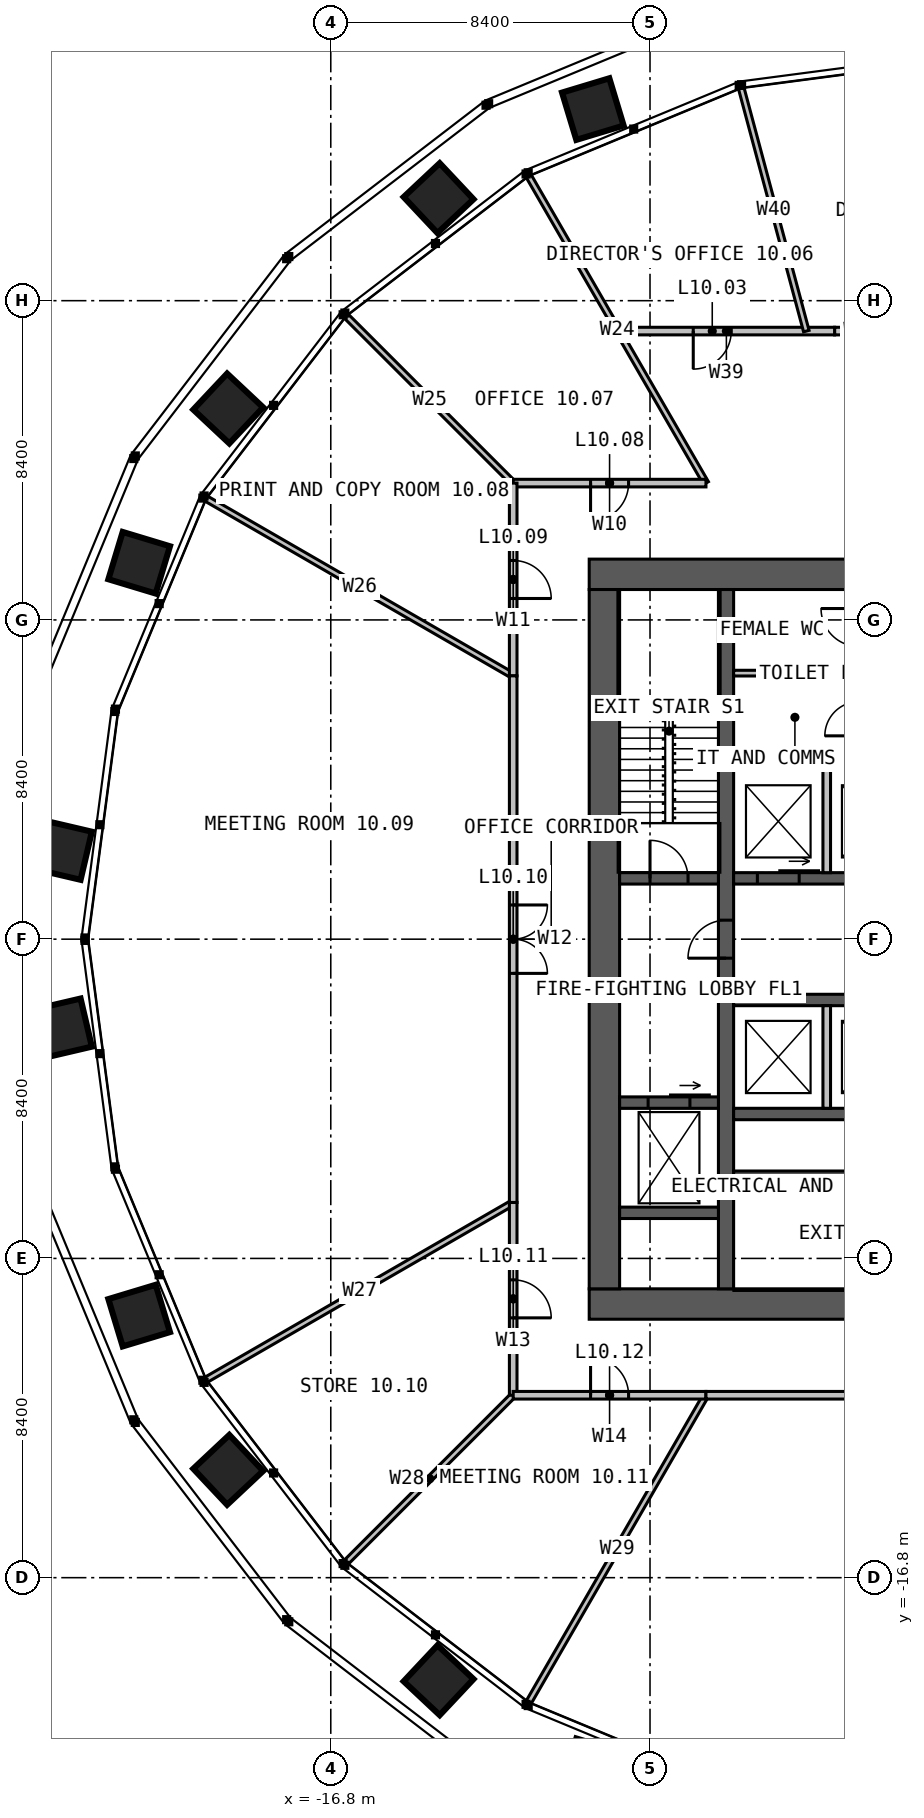
"""IFC4 building model, lengths in metres.
Left out: names, types, materials, properties, quantities, classifications, styles, units other than length and angle.
Written with IfcOpenShell. Run it as: python <this file> out.ifc"""

import sys

from ifc_helpers import new_model, si_unit, direction, frame, frame_2d, origin, place, context, subcontext, project, spatial, rectangle, extrude, element, fill, save


model = new_model("IFC4")
c1 = context("Model", 3, precision=1e-05, world=origin(), true_north=direction((0.0, 1.0)))
c2 = subcontext(c1, "Body", "Model", "MODEL_VIEW")
j1 = project(units=[si_unit("LENGTHUNIT", "METRE"), si_unit("PLANEANGLEUNIT", "RADIAN")], contexts=[c1])
p1 = place(None, origin())
s1 = spatial("IfcSite", under=j1, at=p1, CompositionType="ELEMENT")
p2 = place(p1, origin())
s2 = spatial("IfcBuilding", under=s1, at=p2, CompositionType="ELEMENT")
p3 = place(p2, frame((0.0, 0.0, 45.0)))
s3 = spatial("IfcBuildingStorey", under=s2, at=p3, CompositionType="ELEMENT", Elevation=45.0)
p4 = place(p3, frame((-10.0, 9.6, 0.0), z_axis=(0.0, 0.0, 1.0), x_axis=(1.0, 0.0, 0.0)))
e1 = element("IfcWall", 1, at=p4, inside=s3, PredefinedType="SOLIDWALL", context=c2, shape_type="SweptSolid", body=[
    extrude(rectangle(XDim=20.0, YDim=0.8, at=frame_2d((10.0, 0.0))), origin(), (0.0, 0.0, 1.0), 4.0),
])
p5 = place(p4, frame((9.4, 0.0, 0.0)))
e2 = element("IfcOpeningElement", 2, at=p5, cuts=e1, PredefinedType="OPENING", context=c2, shape_type="SweptSolid", body=[
    extrude(rectangle(XDim=1.2, YDim=2.2, at=frame_2d((0.6, 1.1))), frame((0.0, 0.41, 0.0), z_axis=(0.0, -1.0, 0.0), x_axis=(1.0, 0.0, 0.0)), (0.0, 0.0, 1.0), 0.82),
])
p6 = place(p3, frame((10.0, -9.6, 0.0), z_axis=(0.0, 0.0, 1.0), x_axis=(-1.0, 0.0, 0.0)))
e3 = element("IfcWall", 3, at=p6, inside=s3, PredefinedType="SOLIDWALL", context=c2, shape_type="SweptSolid", body=[
    extrude(rectangle(XDim=20.0, YDim=0.8, at=frame_2d((10.0, 0.0))), origin(), (0.0, 0.0, 1.0), 4.0),
])
p7 = place(p6, frame((6.875, 0.0, 0.0)))
e4 = element("IfcOpeningElement", 4, at=p7, cuts=e3, PredefinedType="OPENING", context=c2, shape_type="SweptSolid", body=[
    extrude(rectangle(XDim=1.2, YDim=2.2, at=frame_2d((0.6, 1.1))), frame((0.0, 0.41, 0.0), z_axis=(0.0, -1.0, 0.0), x_axis=(1.0, 0.0, 0.0)), (0.0, 0.0, 1.0), 0.82),
])
p8 = place(p3, frame((-9.6, 9.2, 0.0), z_axis=(0.0, 0.0, 1.0), x_axis=(0.0, -1.0, 0.0)))
e5 = element("IfcWall", 5, at=p8, inside=s3, PredefinedType="SOLIDWALL", context=c2, shape_type="SweptSolid", body=[
    extrude(rectangle(XDim=18.4, YDim=0.8, at=frame_2d((9.2, 0.0))), origin(), (0.0, 0.0, 1.0), 4.0),
])
p9 = place(p3, frame((-6.4, -9.2, 0.0), z_axis=(0.0, 0.0, 1.0), x_axis=(0.0, 1.0, 0.0)))
e6 = element("IfcWall", 6, at=p9, inside=s3, PredefinedType="SOLIDWALL", context=c2, shape_type="SweptSolid", body=[
    extrude(rectangle(XDim=18.4, YDim=0.4, at=frame_2d((9.2, 0.0))), origin(), (0.0, 0.0, 1.0), 4.0),
])
p10 = place(p9, frame((8.7, 0.0, 0.0)))
e7 = element("IfcOpeningElement", 7, at=p10, cuts=e6, PredefinedType="OPENING", context=c2, shape_type="SweptSolid", body=[
    extrude(rectangle(XDim=1.0, YDim=2.2, at=frame_2d((0.5, 1.1))), frame((0.0, 0.21, 0.0), z_axis=(0.0, -1.0, 0.0), x_axis=(1.0, 0.0, 0.0)), (0.0, 0.0, 1.0), 0.42),
])
p11 = place(p3, frame((-6.2, 1.6, 0.0), z_axis=(0.0, 0.0, 1.0), x_axis=(1.0, 0.0, 0.0)))
e8 = element("IfcWall", 8, at=p11, inside=s3, PredefinedType="SOLIDWALL", context=c2, shape_type="SweptSolid", body=[
    extrude(rectangle(XDim=4.85, YDim=0.3, at=frame_2d((2.425, 0.0))), origin(), (0.0, 0.0, 1.0), 4.0),
])
p12 = place(p11, frame((0.625, 0.0, 0.0)))
e9 = element("IfcOpeningElement", 9, at=p12, cuts=e8, PredefinedType="OPENING", context=c2, shape_type="SweptSolid", body=[
    extrude(rectangle(XDim=1.1, YDim=2.2, at=frame_2d((0.55, 1.1))), frame((0.0, 0.16, 0.0), z_axis=(0.0, -1.0, 0.0), x_axis=(1.0, 0.0, 0.0)), (0.0, 0.0, 1.0), 0.32),
])
p13 = place(p11, frame((3.15, 0.0, 0.0)))
e10 = element("IfcOpeningElement", 10, at=p13, cuts=e8, PredefinedType="OPENING", context=c2, shape_type="SweptSolid", body=[
    extrude(rectangle(XDim=1.1, YDim=2.2, at=frame_2d((0.55, 1.1))), frame((0.0, 0.16, 0.0), z_axis=(0.0, -1.0, 0.0), x_axis=(1.0, 0.0, 0.0)), (0.0, 0.0, 1.0), 0.32),
])
p14 = place(p3, frame((-6.2, 4.6, 0.0), z_axis=(0.0, 0.0, 1.0), x_axis=(1.0, 0.0, 0.0)))
e11 = element("IfcWall", 11, at=p14, inside=s3, PredefinedType="SOLIDWALL", context=c2, shape_type="SweptSolid", body=[
    extrude(rectangle(XDim=4.85, YDim=0.3, at=frame_2d((2.425, 0.0))), origin(), (0.0, 0.0, 1.0), 4.0),
])
for number, where, z_axis, x_axis in (
    (12, (-6.2, -1.6, 0.0), (0.0, 0.0, 1.0), (1.0, 0.0, 0.0)),
    (13, (-6.2, -4.6, 0.0), (0.0, 0.0, 1.0), (1.0, 0.0, 0.0)),
):
    element("IfcWall", number, at=place(p3, frame(where, z_axis=z_axis, x_axis=x_axis)), inside=s3, PredefinedType="SOLIDWALL", context=c2, shape_type="SweptSolid", body=[
        extrude(rectangle(XDim=7.4, YDim=0.3, at=frame_2d((3.7, 0.0))), origin(), (0.0, 0.0, 1.0), 4.0),
    ])
p15 = place(p3, frame((-6.2, -6.2, 0.0), z_axis=(0.0, 0.0, 1.0), x_axis=(1.0, 0.0, 0.0)))
e14 = element("IfcWall", 14, at=p15, inside=s3, PredefinedType="SOLIDWALL", context=c2, shape_type="SweptSolid", body=[
    extrude(rectangle(XDim=7.4, YDim=0.2, at=frame_2d((3.7, 0.0))), origin(), (0.0, 0.0, 1.0), 4.0),
])
p16 = place(p3, frame((-9.2, 1.6, 0.0), z_axis=(0.0, 0.0, 1.0), x_axis=(1.0, 0.0, 0.0)))
e15 = element("IfcWall", 15, at=p16, inside=s3, PredefinedType="SOLIDWALL", context=c2, shape_type="SweptSolid", body=[
    extrude(rectangle(XDim=2.6, YDim=0.3, at=frame_2d((1.3, 0.0))), origin(), (0.0, 0.0, 1.0), 4.0),
])
p17 = place(p16, frame((0.8, 0.0, 0.0)))
e16 = element("IfcOpeningElement", 16, at=p17, cuts=e15, PredefinedType="OPENING", context=c2, shape_type="SweptSolid", body=[
    extrude(rectangle(XDim=1.0, YDim=2.2, at=frame_2d((0.5, 1.1))), frame((0.0, 0.16, 0.0), z_axis=(0.0, -1.0, 0.0), x_axis=(1.0, 0.0, 0.0)), (0.0, 0.0, 1.0), 0.32),
])
p18 = place(p3, frame((-9.2, -4.3, 0.0), z_axis=(0.0, 0.0, 1.0), x_axis=(1.0, 0.0, 0.0)))
e17 = element("IfcWall", 17, at=p18, inside=s3, PredefinedType="SOLIDWALL", context=c2, shape_type="SweptSolid", body=[
    extrude(rectangle(XDim=2.6, YDim=0.3, at=frame_2d((1.3, 0.0))), origin(), (0.0, 0.0, 1.0), 4.0),
])
p19 = place(p18, frame((0.75, 0.0, 0.0)))
e18 = element("IfcOpeningElement", 18, at=p19, cuts=e17, PredefinedType="OPENING", context=c2, shape_type="SweptSolid", body=[
    extrude(rectangle(XDim=1.1, YDim=2.2, at=frame_2d((0.55, 1.1))), frame((0.0, 0.16, 0.0), z_axis=(0.0, -1.0, 0.0), x_axis=(1.0, 0.0, 0.0)), (0.0, 0.0, 1.0), 0.32),
])
p20 = place(p3, frame((-9.2, -7.2, 0.0), z_axis=(0.0, 0.0, 1.0), x_axis=(1.0, 0.0, 0.0)))
e19 = element("IfcWall", 19, at=p20, inside=s3, PredefinedType="SOLIDWALL", context=c2, shape_type="SweptSolid", body=[
    extrude(rectangle(XDim=2.6, YDim=0.3, at=frame_2d((1.3, 0.0))), origin(), (0.0, 0.0, 1.0), 4.0),
])
for number, where, z_axis, x_axis in (
    (20, (-3.75, 1.75, 0.0), (0.0, 0.0, 1.0), (0.0, 1.0, 0.0)),
    (21, (-3.75, -1.75, 0.0), (0.0, 0.0, 1.0), (0.0, -1.0, 0.0)),
):
    element("IfcWall", number, at=place(p3, frame(where, z_axis=z_axis, x_axis=x_axis)), inside=s3, PredefinedType="SOLIDWALL", context=c2, shape_type="SweptSolid", body=[
        extrude(rectangle(XDim=2.7, YDim=0.2, at=frame_2d((1.35, 0.0))), origin(), (0.0, 0.0, 1.0), 3.75),
    ])
p21 = place(p3, frame((-6.2, 7.0, 0.0), z_axis=(0.0, 0.0, 1.0), x_axis=(1.0, 0.0, 0.0)))
e22 = element("IfcWall", 22, at=p21, inside=s3, PredefinedType="PARTITIONING", context=c2, shape_type="SweptSolid", body=[
    extrude(rectangle(XDim=3.225, YDim=0.15, at=frame_2d((1.612, 0.0))), origin(), (0.0, 0.0, 1.0), 3.75),
])
p22 = place(p3, frame((-6.928, 12.0, 0.0), z_axis=(0.0, 0.0, 1.0), x_axis=(-0.499994446179, 0.866028610261, 0.0)))
e23 = element("IfcWall", 23, at=p22, inside=s3, PredefinedType="PARTITIONING", context=c2, shape_type="SweptSolid", body=[
    extrude(rectangle(XDim=9.324, YDim=0.15, at=frame_2d((4.662, 0.0))), origin(), (0.0, 0.0, 1.0), 2.79),
])
p23 = place(p3, frame((-12.0, 12.0, 0.0), z_axis=(0.0, 0.0, 1.0), x_axis=(-0.707106781187, 0.707106781187, 0.0)))
e24 = element("IfcWall", 24, at=p23, inside=s3, PredefinedType="PARTITIONING", context=c2, shape_type="SweptSolid", body=[
    extrude(rectangle(XDim=6.21, YDim=0.15, at=frame_2d((3.105, 0.0))), origin(), (0.0, 0.0, 1.0), 2.79),
])
for number, where, z_axis, x_axis in (
    (25, (-12.0, 6.928, 0.0), (0.0, 0.0, 1.0), (-0.866, 0.5, 0.0)),
    (26, (-12.0, -6.928, 0.0), (0.0, 0.0, 1.0), (-0.866, -0.5, 0.0)),
):
    element("IfcWall", number, at=place(p3, frame(where, z_axis=z_axis, x_axis=x_axis)), inside=s3, PredefinedType="PARTITIONING", context=c2, shape_type="SweptSolid", body=[
        extrude(rectangle(XDim=9.324, YDim=0.15, at=frame_2d((4.662, 0.0))), origin(), (0.0, 0.0, 1.0), 2.79),
    ])
p24 = place(p3, frame((-12.0, -12.0, 0.0), z_axis=(0.0, 0.0, 1.0), x_axis=(-0.707106781187, -0.707106781187, 0.0)))
e27 = element("IfcWall", 27, at=p24, inside=s3, PredefinedType="PARTITIONING", context=c2, shape_type="SweptSolid", body=[
    extrude(rectangle(XDim=6.21, YDim=0.15, at=frame_2d((3.105, 0.0))), origin(), (0.0, 0.0, 1.0), 2.79),
])
p25 = place(p3, frame((-6.928, -12.0, 0.0), z_axis=(0.0, 0.0, 1.0), x_axis=(-0.499994446179, -0.866028610261, 0.0)))
e28 = element("IfcWall", 28, at=p25, inside=s3, PredefinedType="PARTITIONING", context=c2, shape_type="SweptSolid", body=[
    extrude(rectangle(XDim=9.324, YDim=0.15, at=frame_2d((4.662, 0.0))), origin(), (0.0, 0.0, 1.0), 2.79),
])
p26 = place(p3, frame((-2.157, 16.0, 0.0), z_axis=(0.0, 0.0, 1.0), x_axis=(-1.0, 0.0, 0.0)))
e29 = element("IfcWall", 29, at=p26, inside=s3, PredefinedType="PARTITIONING", context=c2, shape_type="SweptSolid", body=[
    extrude(rectangle(XDim=1.387, YDim=0.2, at=frame_2d((0.693, 0.0))), origin(), (0.0, 0.0, 1.0), 3.4),
])
p27 = place(p3, frame((-3.544, 16.0, 0.0), z_axis=(0.0, 0.0, 1.0), x_axis=(-1.0, 0.0, 0.0)))
e30 = element("IfcWall", 30, at=p27, inside=s3, PredefinedType="PARTITIONING", context=c2, shape_type="SweptSolid", body=[
    extrude(rectangle(XDim=5.694, YDim=0.2, at=frame_2d((2.847, 0.0))), origin(), (0.0, 0.0, 1.0), 3.8),
])
p28 = place(p27, frame((2.719, 0.0, 0.0)))
e31 = element("IfcOpeningElement", 31, at=p28, cuts=e30, PredefinedType="OPENING", context=c2, shape_type="SweptSolid", body=[
    extrude(rectangle(XDim=1.0, YDim=2.2, at=frame_2d((0.5, 1.1))), frame((0.0, 0.11, 0.0), z_axis=(0.0, -1.0, 0.0), x_axis=(1.0, 0.0, 0.0)), (0.0, 0.0, 1.0), 0.22),
])
p29 = place(p3, frame((-4.287, 16.0, 0.0), z_axis=(0.0, 0.0, 1.0), x_axis=(-0.258833846319, 0.965921860194, 0.0)))
e32 = element("IfcWall", 32, at=p29, inside=s3, PredefinedType="PARTITIONING", context=c2, shape_type="SweptSolid", body=[
    extrude(rectangle(XDim=6.616, YDim=0.15, at=frame_2d((3.308, 0.0))), origin(), (0.0, 0.0, 1.0), 2.79),
])
p30 = place(p3, frame((-6.928, 12.0, 0.0), z_axis=(0.0, 0.0, 1.0), x_axis=(-1.0, 0.0, 0.0)))
e33 = element("IfcWall", 33, at=p30, inside=s3, PredefinedType="PARTITIONING", context=c2, shape_type="SweptSolid", body=[
    extrude(rectangle(XDim=5.072, YDim=0.2, at=frame_2d((2.536, 0.0))), origin(), (0.0, 0.0, 1.0), 3.8),
])
p31 = place(p30, frame((2.036, 0.0, 0.0)))
e34 = element("IfcOpeningElement", 34, at=p31, cuts=e33, PredefinedType="OPENING", context=c2, shape_type="SweptSolid", body=[
    extrude(rectangle(XDim=1.0, YDim=2.2, at=frame_2d((0.5, 1.1))), frame((0.0, 0.11, 0.0), z_axis=(0.0, -1.0, 0.0), x_axis=(1.0, 0.0, 0.0)), (0.0, 0.0, 1.0), 0.22),
])
p32 = place(p3, frame((-12.0, 12.0, 0.0), z_axis=(0.0, 0.0, 1.0), x_axis=(0.0, -1.0, 0.0)))
e35 = element("IfcWall", 35, at=p32, inside=s3, PredefinedType="PARTITIONING", context=c2, shape_type="SweptSolid", body=[
    extrude(rectangle(XDim=5.072, YDim=0.2, at=frame_2d((2.536, 0.0))), origin(), (0.0, 0.0, 1.0), 3.8),
])
p33 = place(p32, frame((2.036, 0.0, 0.0)))
e36 = element("IfcOpeningElement", 36, at=p33, cuts=e35, PredefinedType="OPENING", context=c2, shape_type="SweptSolid", body=[
    extrude(rectangle(XDim=1.0, YDim=2.2, at=frame_2d((0.5, 1.1))), frame((0.0, 0.11, 0.0), z_axis=(0.0, -1.0, 0.0), x_axis=(1.0, 0.0, 0.0)), (0.0, 0.0, 1.0), 0.22),
])
p34 = place(p3, frame((-12.0, 6.928, 0.0), z_axis=(0.0, 0.0, 1.0), x_axis=(0.0, -1.0, 0.0)))
e37 = element("IfcWall", 37, at=p34, inside=s3, PredefinedType="PARTITIONING", context=c2, shape_type="SweptSolid", body=[
    extrude(rectangle(XDim=13.856, YDim=0.2, at=frame_2d((6.928, 0.0))), origin(), (0.0, 0.0, 1.0), 3.8),
])
p35 = place(p34, frame((6.028, 0.0, 0.0)))
e38 = element("IfcOpeningElement", 38, at=p35, cuts=e37, PredefinedType="OPENING", context=c2, shape_type="SweptSolid", body=[
    extrude(rectangle(XDim=1.8, YDim=2.2, at=frame_2d((0.9, 1.1))), frame((0.0, 0.11, 0.0), z_axis=(0.0, -1.0, 0.0), x_axis=(1.0, 0.0, 0.0)), (0.0, 0.0, 1.0), 0.22),
])
p36 = place(p3, frame((-12.0, -6.928, 0.0), z_axis=(0.0, 0.0, 1.0), x_axis=(0.0, -1.0, 0.0)))
e39 = element("IfcWall", 39, at=p36, inside=s3, PredefinedType="PARTITIONING", context=c2, shape_type="SweptSolid", body=[
    extrude(rectangle(XDim=5.072, YDim=0.2, at=frame_2d((2.536, 0.0))), origin(), (0.0, 0.0, 1.0), 3.8),
])
p37 = place(p36, frame((2.036, 0.0, 0.0)))
e40 = element("IfcOpeningElement", 40, at=p37, cuts=e39, PredefinedType="OPENING", context=c2, shape_type="SweptSolid", body=[
    extrude(rectangle(XDim=1.0, YDim=2.2, at=frame_2d((0.5, 1.1))), frame((0.0, 0.11, 0.0), z_axis=(0.0, -1.0, 0.0), x_axis=(1.0, 0.0, 0.0)), (0.0, 0.0, 1.0), 0.22),
])
p38 = place(p3, frame((-12.0, -12.0, 0.0), z_axis=(0.0, 0.0, 1.0), x_axis=(1.0, 0.0, 0.0)))
e41 = element("IfcWall", 41, at=p38, inside=s3, PredefinedType="PARTITIONING", context=c2, shape_type="SweptSolid", body=[
    extrude(rectangle(XDim=5.072, YDim=0.2, at=frame_2d((2.536, 0.0))), origin(), (0.0, 0.0, 1.0), 3.8),
])
p39 = place(p38, frame((2.036, 0.0, 0.0)))
e42 = element("IfcOpeningElement", 42, at=p39, cuts=e41, PredefinedType="OPENING", context=c2, shape_type="SweptSolid", body=[
    extrude(rectangle(XDim=1.0, YDim=2.2, at=frame_2d((0.5, 1.1))), frame((0.0, 0.11, 0.0), z_axis=(0.0, -1.0, 0.0), x_axis=(1.0, 0.0, 0.0)), (0.0, 0.0, 1.0), 0.22),
])
p40 = place(p3, frame((-6.928, -12.0, 0.0), z_axis=(0.0, 0.0, 1.0), x_axis=(1.0, 0.0, 0.0)))
e43 = element("IfcWall", 43, at=p40, inside=s3, PredefinedType="PARTITIONING", context=c2, shape_type="SweptSolid", body=[
    extrude(rectangle(XDim=13.856, YDim=0.2, at=frame_2d((6.928, 0.0))), origin(), (0.0, 0.0, 1.0), 3.8),
])
p41 = place(p40, frame((6.028, 0.0, 0.0)))
e44 = element("IfcOpeningElement", 44, at=p41, cuts=e43, PredefinedType="OPENING", context=c2, shape_type="SweptSolid", body=[
    extrude(rectangle(XDim=1.8, YDim=2.2, at=frame_2d((0.9, 1.1))), frame((0.0, 0.11, 0.0), z_axis=(0.0, -1.0, 0.0), x_axis=(1.0, 0.0, 0.0)), (0.0, 0.0, 1.0), 0.22),
])
p42 = place(p10, origin())
e45 = element("IfcDoor", 45, at=p42, inside=s3, OperationType="SINGLE_SWING_LEFT", PredefinedType="DOOR", context=c2, shape_type="SweptSolid", body=[
    extrude(rectangle(XDim=1.0, YDim=2.2, at=frame_2d((0.5, 1.1))), frame((0.0, 0.025, 0.0), z_axis=(0.0, -1.0, 0.0), x_axis=(1.0, 0.0, 0.0)), (0.0, 0.0, 1.0), 0.05),
])
fill(e7, e45)
p43 = place(p17, origin())
e46 = element("IfcDoor", 46, at=p43, inside=s3, OperationType="SINGLE_SWING_LEFT", PredefinedType="DOOR", context=c2, shape_type="SweptSolid", body=[
    extrude(rectangle(XDim=1.0, YDim=2.2, at=frame_2d((0.5, 1.1))), frame((0.0, 0.025, 0.0), z_axis=(0.0, -1.0, 0.0), x_axis=(1.0, 0.0, 0.0)), (0.0, 0.0, 1.0), 0.05),
])
fill(e16, e46)
p44 = place(p12, origin())
e47 = element("IfcDoor", 47, at=p44, inside=s3, OperationType="SLIDING_TO_LEFT", PredefinedType="DOOR", context=c2, shape_type="SweptSolid", body=[
    extrude(rectangle(XDim=1.1, YDim=2.2, at=frame_2d((0.55, 1.1))), frame((0.0, 0.025, 0.0), z_axis=(0.0, -1.0, 0.0), x_axis=(1.0, 0.0, 0.0)), (0.0, 0.0, 1.0), 0.05),
])
fill(e9, e47)
p45 = place(p19, origin())
e48 = element("IfcDoor", 48, at=p45, inside=s3, OperationType="SLIDING_TO_LEFT", PredefinedType="DOOR", context=c2, shape_type="SweptSolid", body=[
    extrude(rectangle(XDim=1.1, YDim=2.2, at=frame_2d((0.55, 1.1))), frame((0.0, 0.025, 0.0), z_axis=(0.0, -1.0, 0.0), x_axis=(1.0, 0.0, 0.0)), (0.0, 0.0, 1.0), 0.05),
])
fill(e18, e48)
p46 = place(p28, origin())
e49 = element("IfcDoor", 49, at=p46, inside=s3, OperationType="SINGLE_SWING_RIGHT", PredefinedType="DOOR", context=c2, shape_type="SweptSolid", body=[
    extrude(rectangle(XDim=1.0, YDim=2.2, at=frame_2d((0.5, 1.1))), frame((0.0, 0.025, 0.0), z_axis=(0.0, -1.0, 0.0), x_axis=(1.0, 0.0, 0.0)), (0.0, 0.0, 1.0), 0.05),
])
fill(e31, e49)
p47 = place(p31, origin())
e50 = element("IfcDoor", 50, at=p47, inside=s3, OperationType="SINGLE_SWING_RIGHT", PredefinedType="DOOR", context=c2, shape_type="SweptSolid", body=[
    extrude(rectangle(XDim=1.0, YDim=2.2, at=frame_2d((0.5, 1.1))), frame((0.0, 0.025, 0.0), z_axis=(0.0, -1.0, 0.0), x_axis=(1.0, 0.0, 0.0)), (0.0, 0.0, 1.0), 0.05),
])
fill(e34, e50)
p48 = place(p33, origin())
e51 = element("IfcDoor", 51, at=p48, inside=s3, OperationType="SINGLE_SWING_RIGHT", PredefinedType="DOOR", context=c2, shape_type="SweptSolid", body=[
    extrude(rectangle(XDim=1.0, YDim=2.2, at=frame_2d((0.5, 1.1))), frame((0.0, 0.025, 0.0), z_axis=(0.0, -1.0, 0.0), x_axis=(1.0, 0.0, 0.0)), (0.0, 0.0, 1.0), 0.05),
])
fill(e36, e51)
p49 = place(p35, origin())
e52 = element("IfcDoor", 52, at=p49, inside=s3, OperationType="DOUBLE_DOOR_SINGLE_SWING", PredefinedType="DOOR", context=c2, shape_type="SweptSolid", body=[
    extrude(rectangle(XDim=1.8, YDim=2.2, at=frame_2d((0.9, 1.1))), frame((0.0, 0.025, 0.0), z_axis=(0.0, -1.0, 0.0), x_axis=(1.0, 0.0, 0.0)), (0.0, 0.0, 1.0), 0.05),
])
fill(e38, e52)
p50 = place(p37, origin())
e53 = element("IfcDoor", 53, at=p50, inside=s3, OperationType="SINGLE_SWING_RIGHT", PredefinedType="DOOR", context=c2, shape_type="SweptSolid", body=[
    extrude(rectangle(XDim=1.0, YDim=2.2, at=frame_2d((0.5, 1.1))), frame((0.0, 0.025, 0.0), z_axis=(0.0, -1.0, 0.0), x_axis=(1.0, 0.0, 0.0)), (0.0, 0.0, 1.0), 0.05),
])
fill(e40, e53)
p51 = place(p39, origin())
e54 = element("IfcDoor", 54, at=p51, inside=s3, OperationType="SINGLE_SWING_LEFT", PredefinedType="DOOR", context=c2, shape_type="SweptSolid", body=[
    extrude(rectangle(XDim=1.0, YDim=2.2, at=frame_2d((0.5, 1.1))), frame((0.0, 0.025, 0.0), z_axis=(0.0, -1.0, 0.0), x_axis=(1.0, 0.0, 0.0)), (0.0, 0.0, 1.0), 0.05),
])
fill(e42, e54)
save(model, sys.argv[1])
